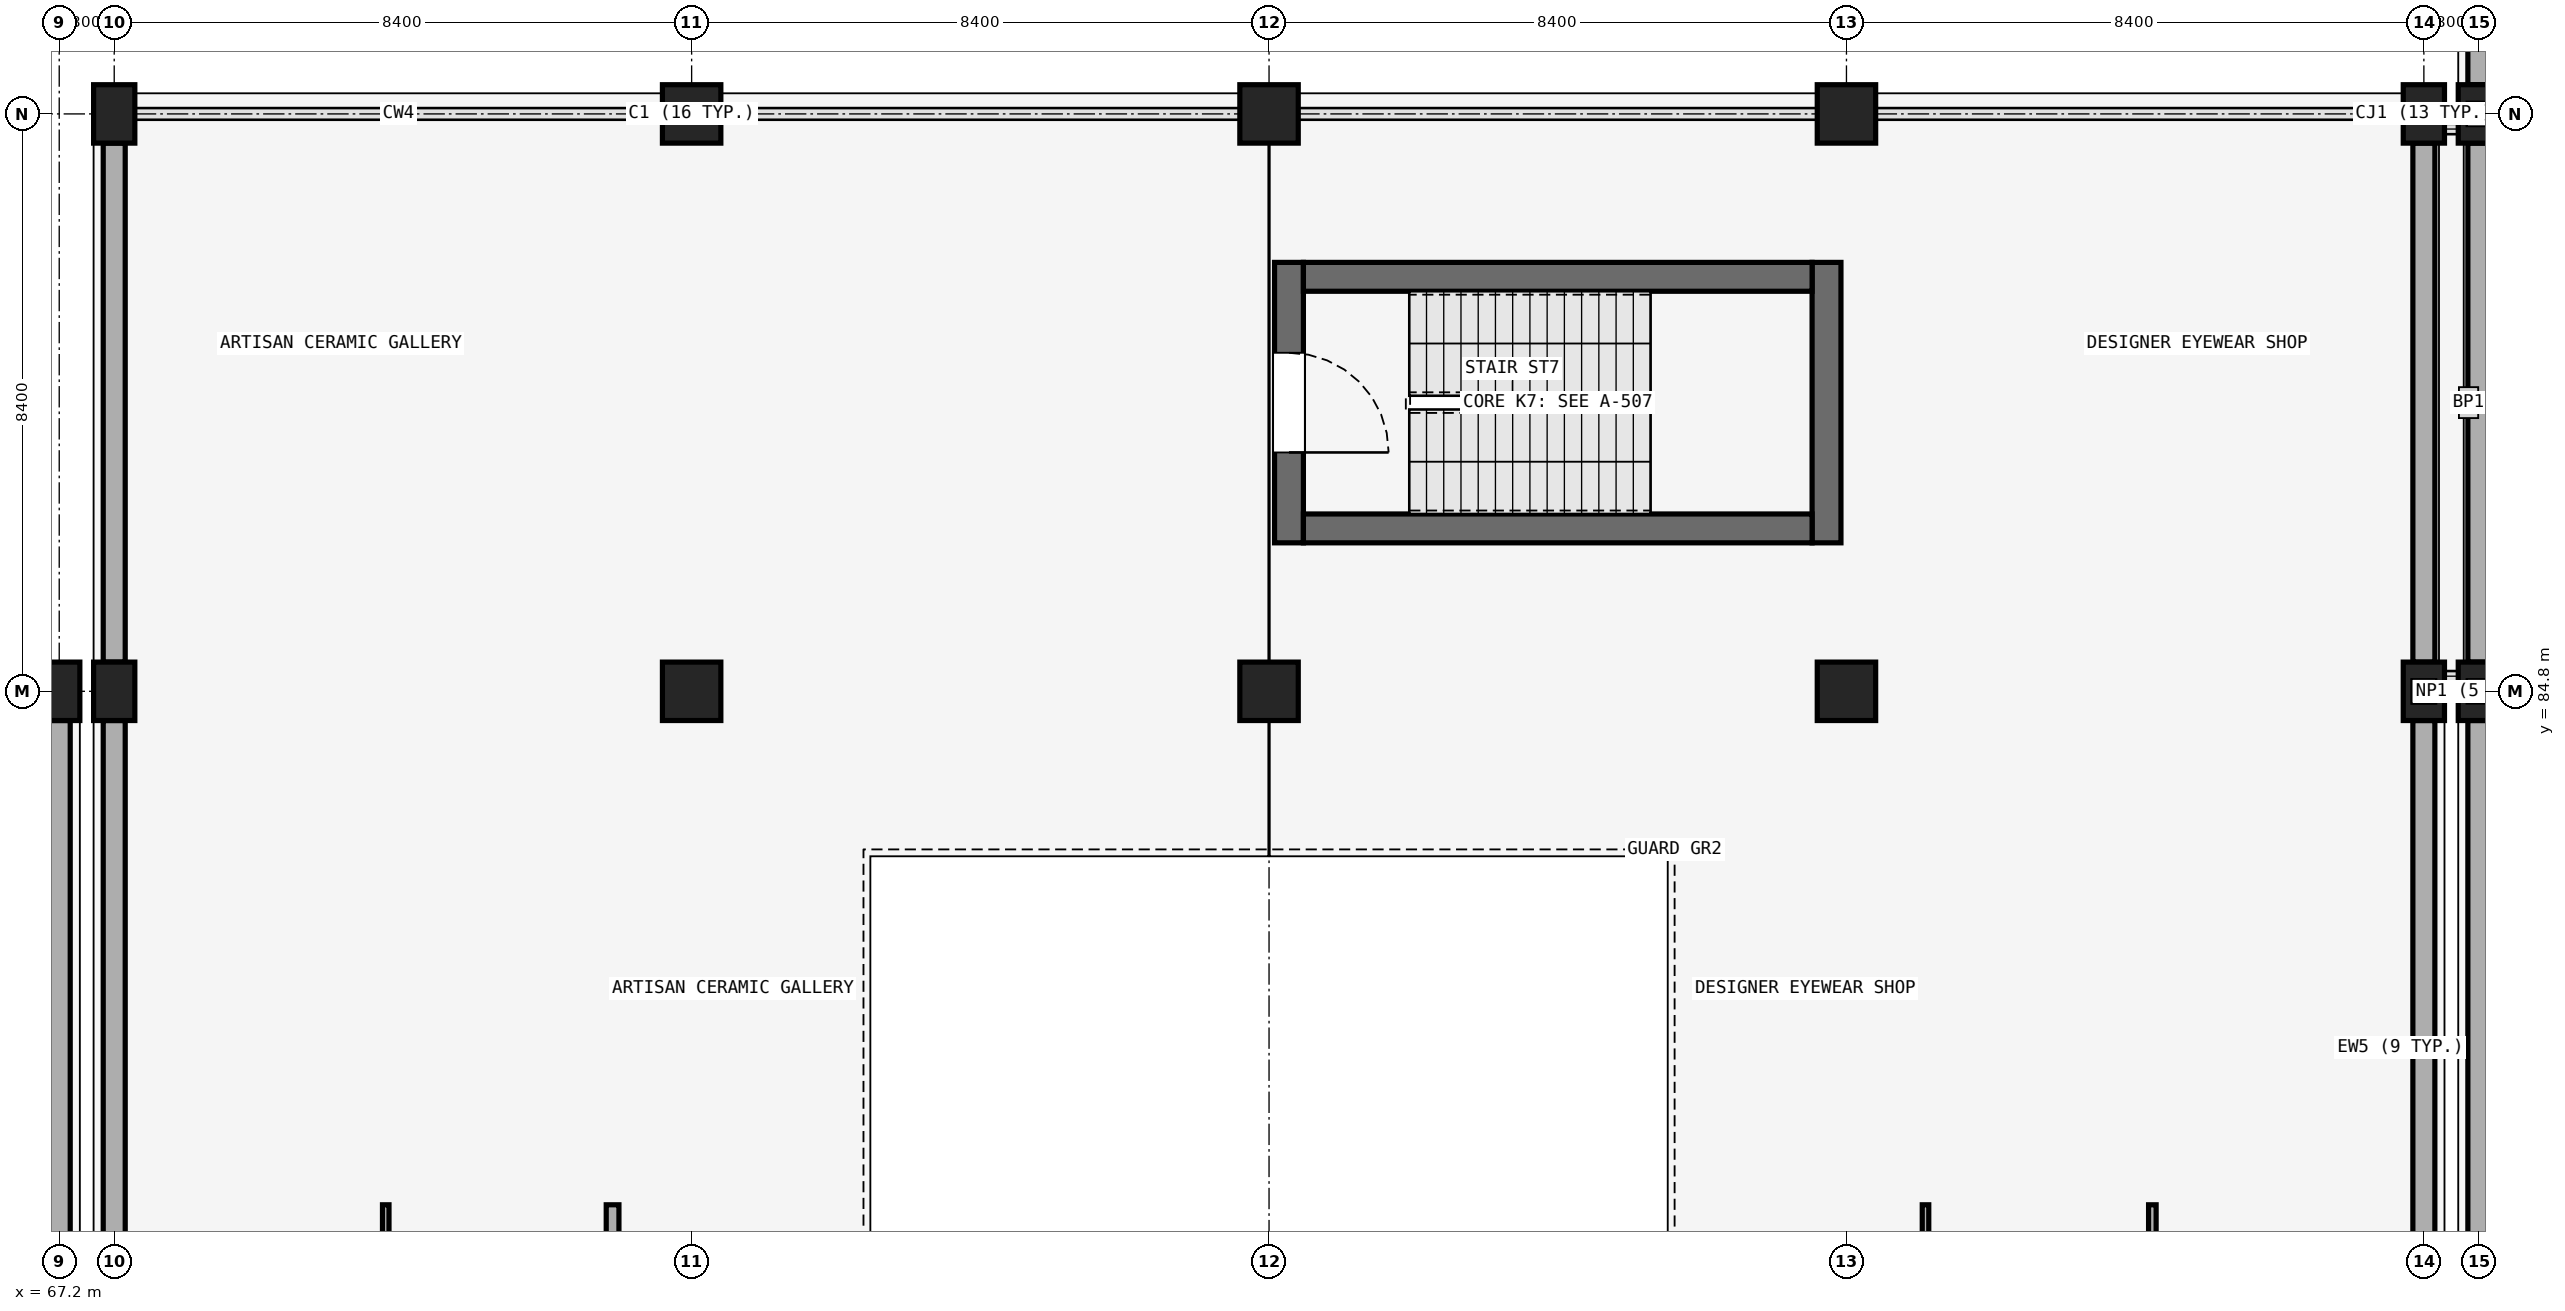
"""IFC4 building model, lengths in metres.
Left out: names, types, materials, properties, quantities, classifications, styles, units other than length and angle.
Written with IfcOpenShell. Run it as: python <this file> out.ifc"""

import sys

from ifc_helpers import new_model, si_unit, direction, frame, frame_2d, origin, origin_2d, place, context, subcontext, project, spatial, rectangle, extrude, element, fill, save


model = new_model("IFC4")
c1 = context("Model", 3, precision=1e-05, world=origin(), true_north=direction((0.0, 1.0)))
c2 = subcontext(c1, "Body", "Model", "MODEL_VIEW")
j1 = project(units=[si_unit("LENGTHUNIT", "METRE"), si_unit("PLANEANGLEUNIT", "RADIAN")], contexts=[c1])
p1 = place(None, origin())
s1 = spatial("IfcSite", under=j1, at=p1, CompositionType="ELEMENT")
p2 = place(p1, origin())
s2 = spatial("IfcBuilding", under=s1, at=p2, CompositionType="ELEMENT")
p3 = place(p2, frame((0.0, 0.0, 5.4)))
s3 = spatial("IfcBuildingStorey", under=s2, at=p3, CompositionType="ELEMENT", Elevation=5.4)
for number, where, z_axis, x_axis in (
    (1, (67.2, 84.8, 0.0), (0.0, 0.0, 1.0), (1.0, 0.0, 0.0)),
    (2, (68.0, 84.8, 0.0), (0.0, 0.0, 1.0), (1.0, 0.0, 0.0)),
):
    element("IfcColumn", number, at=place(p3, frame(where, z_axis=z_axis, x_axis=x_axis)), inside=s3, PredefinedType="COLUMN", context=c2, shape_type="SweptSolid", body=[
        extrude(rectangle(XDim=0.6, YDim=0.85, at=origin_2d()), origin(), (0.0, 0.0, 1.0), 4.5),
    ])
for number, where, z_axis, x_axis in (
    (3, (76.4, 84.8, 0.0), (0.0, 0.0, 1.0), (1.0, 0.0, 0.0)),
    (4, (84.8, 84.8, 0.0), (0.0, 0.0, 1.0), (1.0, 0.0, 0.0)),
    (5, (93.2, 84.8, 0.0), (0.0, 0.0, 1.0), (1.0, 0.0, 0.0)),
):
    element("IfcColumn", number, at=place(p3, frame(where, z_axis=z_axis, x_axis=x_axis)), inside=s3, PredefinedType="COLUMN", context=c2, shape_type="SweptSolid", body=[
        extrude(rectangle(XDim=0.85, YDim=0.85, at=origin_2d()), origin(), (0.0, 0.0, 1.0), 4.5),
    ])
for number, where, z_axis, x_axis in (
    (6, (101.6, 84.8, 0.0), (0.0, 0.0, 1.0), (1.0, 0.0, 0.0)),
    (7, (68.0, 93.2, 0.0), (0.0, 0.0, 1.0), (1.0, 0.0, 0.0)),
):
    element("IfcColumn", number, at=place(p3, frame(where, z_axis=z_axis, x_axis=x_axis)), inside=s3, PredefinedType="COLUMN", context=c2, shape_type="SweptSolid", body=[
        extrude(rectangle(XDim=0.6, YDim=0.85, at=origin_2d()), origin(), (0.0, 0.0, 1.0), 4.5),
    ])
for number, where, z_axis, x_axis in (
    (8, (76.4, 93.2, 0.0), (0.0, 0.0, 1.0), (1.0, 0.0, 0.0)),
    (9, (84.8, 93.2, 0.0), (0.0, 0.0, 1.0), (1.0, 0.0, 0.0)),
    (10, (93.2, 93.2, 0.0), (0.0, 0.0, 1.0), (1.0, 0.0, 0.0)),
):
    element("IfcColumn", number, at=place(p3, frame(where, z_axis=z_axis, x_axis=x_axis)), inside=s3, PredefinedType="COLUMN", context=c2, shape_type="SweptSolid", body=[
        extrude(rectangle(XDim=0.85, YDim=0.85, at=origin_2d()), origin(), (0.0, 0.0, 1.0), 4.5),
    ])
for number, where, z_axis, x_axis in (
    (11, (101.6, 93.2, 0.0), (0.0, 0.0, 1.0), (1.0, 0.0, 0.0)),
    (12, (102.4, 84.8, 0.0), (0.0, 0.0, 1.0), (1.0, 0.0, 0.0)),
    (13, (102.4, 93.2, 0.0), (0.0, 0.0, 1.0), (1.0, 0.0, 0.0)),
):
    element("IfcColumn", number, at=place(p3, frame(where, z_axis=z_axis, x_axis=x_axis)), inside=s3, PredefinedType="COLUMN", context=c2, shape_type="SweptSolid", body=[
        extrude(rectangle(XDim=0.6, YDim=0.85, at=origin_2d()), origin(), (0.0, 0.0, 1.0), 4.5),
    ])
for number, where, z_axis, x_axis in (
    (14, (67.2, 76.825, 0.0), (0.0, 0.0, 1.0), (0.0, 1.0, 0.0)),
    (15, (68.0, 76.825, 0.0), (0.0, 0.0, 1.0), (0.0, 1.0, 0.0)),
):
    element("IfcWall", number, at=place(p3, frame(where, z_axis=z_axis, x_axis=x_axis)), inside=s3, PredefinedType="SOLIDWALL", context=c2, shape_type="SweptSolid", body=[
        extrude(rectangle(XDim=7.55, YDim=0.32, at=frame_2d((3.775, 0.0))), origin(), (0.0, 0.0, 1.0), 3.45),
    ])
p4 = place(p3, frame((68.0, 85.225, 0.0), z_axis=(0.0, 0.0, 1.0), x_axis=(0.0, 1.0, 0.0)))
e16 = element("IfcWall", 16, at=p4, inside=s3, PredefinedType="SOLIDWALL", context=c2, shape_type="SweptSolid", body=[
    extrude(rectangle(XDim=7.55, YDim=0.32, at=frame_2d((3.775, 0.0))), origin(), (0.0, 0.0, 1.0), 3.45),
])
p5 = place(p3, frame((101.6, 76.825, 0.0), z_axis=(0.0, 0.0, 1.0), x_axis=(0.0, 1.0, 0.0)))
e17 = element("IfcWall", 17, at=p5, inside=s3, PredefinedType="SOLIDWALL", context=c2, shape_type="SweptSolid", body=[
    extrude(rectangle(XDim=7.55, YDim=0.32, at=frame_2d((3.775, 0.0))), origin(), (0.0, 0.0, 1.0), 3.45),
])
p6 = place(p3, frame((101.6, 85.225, 0.0), z_axis=(0.0, 0.0, 1.0), x_axis=(0.0, 1.0, 0.0)))
e18 = element("IfcWall", 18, at=p6, inside=s3, PredefinedType="SOLIDWALL", context=c2, shape_type="SweptSolid", body=[
    extrude(rectangle(XDim=7.55, YDim=0.32, at=frame_2d((3.775, 0.0))), origin(), (0.0, 0.0, 1.0), 3.45),
])
p7 = place(p3, frame((102.4, 76.825, 0.0), z_axis=(0.0, 0.0, 1.0), x_axis=(0.0, 1.0, 0.0)))
e19 = element("IfcWall", 19, at=p7, inside=s3, PredefinedType="SOLIDWALL", context=c2, shape_type="SweptSolid", body=[
    extrude(rectangle(XDim=7.55, YDim=0.32, at=frame_2d((3.775, 0.0))), origin(), (0.0, 0.0, 1.0), 3.45),
])
p8 = place(p3, frame((102.4, 85.225, 0.0), z_axis=(0.0, 0.0, 1.0), x_axis=(0.0, 1.0, 0.0)))
e20 = element("IfcWall", 20, at=p8, inside=s3, PredefinedType="SOLIDWALL", context=c2, shape_type="SweptSolid", body=[
    extrude(rectangle(XDim=7.55, YDim=0.32, at=frame_2d((3.775, 0.0))), origin(), (0.0, 0.0, 1.0), 3.45),
])
p9 = place(p3, frame((102.4, 93.625, 0.0), z_axis=(0.0, 0.0, 1.0), x_axis=(0.0, 1.0, 0.0)))
e21 = element("IfcWall", 21, at=p9, inside=s3, PredefinedType="SOLIDWALL", context=c2, shape_type="SweptSolid", body=[
    extrude(rectangle(XDim=7.55, YDim=0.32, at=frame_2d((3.775, 0.0))), origin(), (0.0, 0.0, 1.0), 3.45),
])
p10 = place(p3, frame((85.09, 91.04, 0.0), z_axis=(0.0, 0.0, 1.0), x_axis=(0.0, -1.0, 0.0)))
e22 = element("IfcWall", 22, at=p10, inside=s3, PredefinedType="SHEAR", context=c2, shape_type="SweptSolid", body=[
    extrude(rectangle(XDim=4.08, YDim=0.42, at=frame_2d((2.04, 0.0))), origin(), (0.0, 0.0, 1.0), 4.2),
])
p11 = place(p10, frame((1.315, 0.0, 0.0)))
e23 = element("IfcOpeningElement", 23, at=p11, cuts=e22, PredefinedType="OPENING", context=c2, shape_type="SweptSolid", body=[
    extrude(rectangle(XDim=1.45, YDim=2.2, at=frame_2d((0.725, 1.1))), frame((0.0, 0.22, 0.0), z_axis=(0.0, -1.0, 0.0), x_axis=(1.0, 0.0, 0.0)), (0.0, 0.0, 1.0), 0.44),
])
p12 = place(p3, frame((92.91, 86.96, 0.0), z_axis=(0.0, 0.0, 1.0), x_axis=(0.0, 1.0, 0.0)))
e24 = element("IfcWall", 24, at=p12, inside=s3, PredefinedType="SHEAR", context=c2, shape_type="SweptSolid", body=[
    extrude(rectangle(XDim=4.08, YDim=0.42, at=frame_2d((2.04, 0.0))), origin(), (0.0, 0.0, 1.0), 4.2),
])
for number, where, z_axis, x_axis in (
    (25, (85.3, 87.17, 0.0), (0.0, 0.0, 1.0), (1.0, 0.0, 0.0)),
    (26, (85.3, 90.83, 0.0), (0.0, 0.0, 1.0), (1.0, 0.0, 0.0)),
):
    element("IfcWall", number, at=place(p3, frame(where, z_axis=z_axis, x_axis=x_axis)), inside=s3, PredefinedType="SHEAR", context=c2, shape_type="SweptSolid", body=[
        extrude(rectangle(XDim=7.4, YDim=0.42, at=frame_2d((3.7, 0.0))), origin(), (0.0, 0.0, 1.0), 4.2),
    ])
p13 = place(p3, frame((71.95, 69.87, 0.0), z_axis=(0.0, 0.0, 1.0), x_axis=(0.0, 1.0, 0.0)))
e27 = element("IfcWall", 27, at=p13, inside=s3, PredefinedType="PARTITIONING", context=c2, shape_type="SweptSolid", body=[
    extrude(rectangle(XDim=7.46, YDim=0.095, at=frame_2d((3.73, 0.0))), origin(), (0.0, 0.0, 1.0), 3.45),
])
p14 = place(p13, frame((3.17, 0.0, 0.0)))
e28 = element("IfcOpeningElement", 28, at=p14, cuts=e27, PredefinedType="OPENING", context=c2, shape_type="SweptSolid", body=[
    extrude(rectangle(XDim=1.12, YDim=2.22, at=frame_2d((0.56, 1.11))), frame((0.0, 0.057, 0.0), z_axis=(0.0, -1.0, 0.0), x_axis=(1.0, 0.0, 0.0)), (0.0, 0.0, 1.0), 0.115),
])
p15 = place(p3, frame((75.25, 69.87, 0.0), z_axis=(0.0, 0.0, 1.0), x_axis=(0.0, 1.0, 0.0)))
e29 = element("IfcWall", 29, at=p15, inside=s3, PredefinedType="PARTITIONING", context=c2, shape_type="SweptSolid", body=[
    extrude(rectangle(XDim=7.46, YDim=0.185, at=frame_2d((3.73, 0.0))), origin(), (0.0, 0.0, 1.0), 3.45),
])
p16 = place(p15, frame((3.17, 0.0, 0.0)))
e30 = element("IfcOpeningElement", 30, at=p16, cuts=e29, PredefinedType="OPENING", context=c2, shape_type="SweptSolid", body=[
    extrude(rectangle(XDim=1.12, YDim=2.34, at=frame_2d((0.56, 1.17))), frame((0.0, 0.103, 0.0), z_axis=(0.0, -1.0, 0.0), x_axis=(1.0, 0.0, 0.0)), (0.0, 0.0, 1.0), 0.205),
])
p17 = place(p3, frame((97.65, 69.87, 0.0), z_axis=(0.0, 0.0, 1.0), x_axis=(0.0, 1.0, 0.0)))
e31 = element("IfcWall", 31, at=p17, inside=s3, PredefinedType="PARTITIONING", context=c2, shape_type="SweptSolid", body=[
    extrude(rectangle(XDim=7.46, YDim=0.11, at=frame_2d((3.73, 0.0))), origin(), (0.0, 0.0, 1.0), 3.45),
])
p18 = place(p17, frame((3.14, 0.0, 0.0)))
e32 = element("IfcOpeningElement", 32, at=p18, cuts=e31, PredefinedType="OPENING", context=c2, shape_type="SweptSolid", body=[
    extrude(rectangle(XDim=1.18, YDim=2.46, at=frame_2d((0.59, 1.23))), frame((0.0, 0.065, 0.0), z_axis=(0.0, -1.0, 0.0), x_axis=(1.0, 0.0, 0.0)), (0.0, 0.0, 1.0), 0.13),
])
p19 = place(p3, frame((94.35, 69.87, 0.0), z_axis=(0.0, 0.0, 1.0), x_axis=(0.0, 1.0, 0.0)))
e33 = element("IfcWall", 33, at=p19, inside=s3, PredefinedType="PARTITIONING", context=c2, shape_type="SweptSolid", body=[
    extrude(rectangle(XDim=7.46, YDim=0.095, at=frame_2d((3.73, 0.0))), origin(), (0.0, 0.0, 1.0), 3.45),
])
p20 = place(p19, frame((3.09, 0.0, 0.0)))
e34 = element("IfcOpeningElement", 34, at=p20, cuts=e33, PredefinedType="OPENING", context=c2, shape_type="SweptSolid", body=[
    extrude(rectangle(XDim=1.28, YDim=2.1, at=frame_2d((0.64, 1.05))), frame((0.0, 0.057, 0.0), z_axis=(0.0, -1.0, 0.0), x_axis=(1.0, 0.0, 0.0)), (0.0, 0.0, 1.0), 0.115),
])
p21 = place(p11, origin())
e35 = element("IfcDoor", 35, at=p21, inside=s3, OperationType="SINGLE_SWING_RIGHT", PredefinedType="DOOR", context=c2, shape_type="SweptSolid", body=[
    extrude(rectangle(XDim=1.45, YDim=2.2, at=frame_2d((0.725, 1.1))), frame((0.0, 0.025, 0.0), z_axis=(0.0, -1.0, 0.0), x_axis=(1.0, 0.0, 0.0)), (0.0, 0.0, 1.0), 0.05),
])
fill(e23, e35)
save(model, sys.argv[1])
